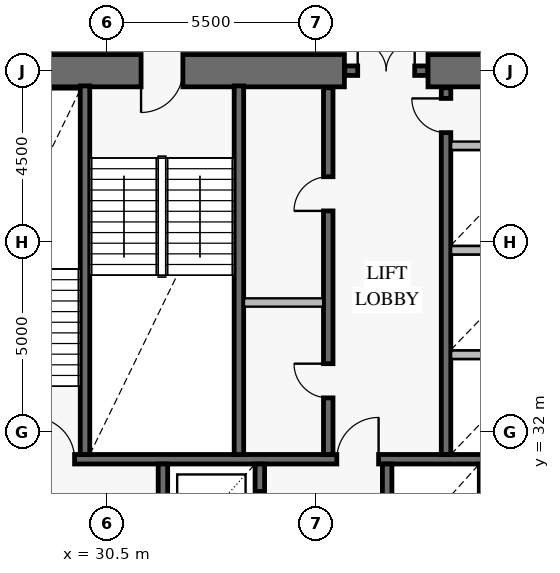
"""IFC4 building model, lengths in metres.
Left out: names, types, materials, properties, quantities, classifications, styles, units other than length and angle.
Written with IfcOpenShell. Run it as: python <this file> out.ifc"""

import sys

from ifc_helpers import new_model, si_unit, direction, frame, frame_2d, origin, place, context, subcontext, project, spatial, rectangle, extrude, element, fill, save


model = new_model("IFC4")
c1 = context("Model", 3, precision=1e-05, world=origin(), true_north=direction((0.0, 1.0)))
c2 = subcontext(c1, "Body", "Model", "MODEL_VIEW")
j1 = project(units=[si_unit("LENGTHUNIT", "METRE"), si_unit("PLANEANGLEUNIT", "RADIAN")], contexts=[c1])
p1 = place(None, origin())
s1 = spatial("IfcSite", under=j1, at=p1, CompositionType="ELEMENT")
p2 = place(p1, origin())
s2 = spatial("IfcBuilding", under=s1, at=p2, CompositionType="ELEMENT")
p3 = place(p2, frame((0.0, 0.0, 12.0)))
s3 = spatial("IfcBuildingStorey", under=s2, at=p3, CompositionType="ELEMENT", Elevation=12.0)
p4 = place(p3, frame((46.925, 41.5, 0.0), z_axis=(0.0, 0.0, 1.0), x_axis=(-1.0, 0.0, 0.0)))
e1 = element("IfcWall", 1, at=p4, inside=s3, PredefinedType="SHEAR", context=c2, shape_type="SweptSolid", body=[
    extrude(rectangle(XDim=7.975, YDim=0.85, at=frame_2d((3.988, 0.0))), origin(), (0.0, 0.0, 1.0), 4.2),
])
p5 = place(p3, frame((36.75, 41.5, 0.0), z_axis=(0.0, 0.0, 1.0), x_axis=(-1.0, 0.0, 0.0)))
e2 = element("IfcWall", 2, at=p5, inside=s3, PredefinedType="SHEAR", context=c2, shape_type="SweptSolid", body=[
    extrude(rectangle(XDim=11.675, YDim=0.85, at=frame_2d((5.837, 0.0))), origin(), (0.0, 0.0, 1.0), 4.2),
])
p6 = place(p5, frame((4.25, 0.0, 0.0)))
e3 = element("IfcOpeningElement", 3, at=p6, cuts=e2, PredefinedType="OPENING", context=c2, shape_type="SweptSolid", body=[
    extrude(rectangle(XDim=1.1, YDim=2.15, at=frame_2d((0.55, 1.075))), frame((0.0, 0.437, 0.0), z_axis=(0.0, -1.0, 0.0), x_axis=(1.0, 0.0, 0.0)), (0.0, 0.0, 1.0), 0.874),
])
p7 = place(p3, frame((36.76, 41.5, 0.0), z_axis=(0.0, 0.0, 1.0), x_axis=(1.0, 0.0, 0.0)))
e4 = element("IfcWall", 4, at=p7, inside=s3, PredefinedType="SOLIDWALL", context=c2, shape_type="SweptSolid", body=[
    extrude(rectangle(XDim=2.18, YDim=0.25, at=frame_2d((1.09, 0.0))), origin(), (0.0, 0.0, 1.0), 4.2),
])
p8 = place(p7, frame((0.34, 0.0, 0.0)))
e5 = element("IfcOpeningElement", 5, at=p8, cuts=e4, PredefinedType="OPENING", context=c2, shape_type="SweptSolid", body=[
    extrude(rectangle(XDim=1.5, YDim=2.15, at=frame_2d((0.75, 1.075))), frame((0.0, 0.137, 0.0), z_axis=(0.0, -1.0, 0.0), x_axis=(1.0, 0.0, 0.0)), (0.0, 0.0, 1.0), 0.274),
])
p9 = place(p3, frame((25.95, 31.275, 0.0), z_axis=(0.0, 0.0, 1.0), x_axis=(1.0, 0.0, 0.0)))
e6 = element("IfcWall", 6, at=p9, inside=s3, PredefinedType="SOLIDWALL", context=c2, shape_type="SweptSolid", body=[
    extrude(rectangle(XDim=20.1, YDim=0.25, at=frame_2d((10.05, 0.0))), origin(), (0.0, 0.0, 1.0), 4.2),
])
p10 = place(p9, frame((2.6, 0.0, 0.0)))
e7 = element("IfcOpeningElement", 7, at=p10, cuts=e6, PredefinedType="OPENING", context=c2, shape_type="SweptSolid", body=[
    extrude(rectangle(XDim=1.1, YDim=2.15, at=frame_2d((0.55, 1.075))), frame((0.0, 0.137, 0.0), z_axis=(0.0, -1.0, 0.0), x_axis=(1.0, 0.0, 0.0)), (0.0, 0.0, 1.0), 0.274),
])
p11 = place(p9, frame((10.6, 0.0, 0.0)))
e8 = element("IfcOpeningElement", 8, at=p11, cuts=e6, PredefinedType="OPENING", context=c2, shape_type="SweptSolid", body=[
    extrude(rectangle(XDim=1.1, YDim=2.15, at=frame_2d((0.55, 1.075))), frame((0.0, 0.137, 0.0), z_axis=(0.0, -1.0, 0.0), x_axis=(1.0, 0.0, 0.0)), (0.0, 0.0, 1.0), 0.274),
])
p12 = place(p9, frame((16.35, 0.0, 0.0)))
e9 = element("IfcOpeningElement", 9, at=p12, cuts=e6, PredefinedType="OPENING", context=c2, shape_type="SweptSolid", body=[
    extrude(rectangle(XDim=1.1, YDim=2.15, at=frame_2d((0.55, 1.075))), frame((0.0, 0.137, 0.0), z_axis=(0.0, -1.0, 0.0), x_axis=(1.0, 0.0, 0.0)), (0.0, 0.0, 1.0), 0.274),
])
for number, where, z_axis, x_axis in (
    (10, (29.925, 31.4, 0.0), (0.0, 0.0, 1.0), (0.0, 1.0, 0.0)),
    (11, (33.975, 31.4, 0.0), (0.0, 0.0, 1.0), (0.0, 1.0, 0.0)),
):
    element("IfcWall", number, at=place(p3, frame(where, z_axis=z_axis, x_axis=x_axis)), inside=s3, PredefinedType="SOLIDWALL", context=c2, shape_type="SweptSolid", body=[
        extrude(rectangle(XDim=9.7, YDim=0.25, at=frame_2d((4.85, 0.0))), origin(), (0.0, 0.0, 1.0), 4.2),
    ])
p13 = place(p3, frame((36.325, 31.4, 0.0), z_axis=(0.0, 0.0, 1.0), x_axis=(0.0, 1.0, 0.0)))
e12 = element("IfcWall", 12, at=p13, inside=s3, PredefinedType="SOLIDWALL", context=c2, shape_type="SweptSolid", body=[
    extrude(rectangle(XDim=9.65, YDim=0.25, at=frame_2d((4.825, 0.0))), origin(), (0.0, 0.0, 1.0), 4.2),
])
p14 = place(p13, frame((1.49, 0.0, 0.0)))
e13 = element("IfcOpeningElement", 13, at=p14, cuts=e12, PredefinedType="OPENING", context=c2, shape_type="SweptSolid", body=[
    extrude(rectangle(XDim=0.9, YDim=2.1, at=frame_2d((0.45, 1.05))), frame((0.0, 0.137, 0.0), z_axis=(0.0, -1.0, 0.0), x_axis=(1.0, 0.0, 0.0)), (0.0, 0.0, 1.0), 0.274),
])
p15 = place(p13, frame((6.41, 0.0, 0.0)))
e14 = element("IfcOpeningElement", 14, at=p15, cuts=e12, PredefinedType="OPENING", context=c2, shape_type="SweptSolid", body=[
    extrude(rectangle(XDim=0.9, YDim=2.1, at=frame_2d((0.45, 1.05))), frame((0.0, 0.137, 0.0), z_axis=(0.0, -1.0, 0.0), x_axis=(1.0, 0.0, 0.0)), (0.0, 0.0, 1.0), 0.274),
])
p16 = place(p3, frame((39.425, 31.4, 0.0), z_axis=(0.0, 0.0, 1.0), x_axis=(0.0, 1.0, 0.0)))
e15 = element("IfcWall", 15, at=p16, inside=s3, PredefinedType="SOLIDWALL", context=c2, shape_type="SweptSolid", body=[
    extrude(rectangle(XDim=9.65, YDim=0.25, at=frame_2d((4.825, 0.0))), origin(), (0.0, 0.0, 1.0), 4.2),
])
p17 = place(p16, frame((8.47, 0.0, 0.0)))
e16 = element("IfcOpeningElement", 16, at=p17, cuts=e15, PredefinedType="OPENING", context=c2, shape_type="SweptSolid", body=[
    extrude(rectangle(XDim=0.9, YDim=2.1, at=frame_2d((0.45, 1.05))), frame((0.0, 0.137, 0.0), z_axis=(0.0, -1.0, 0.0), x_axis=(1.0, 0.0, 0.0)), (0.0, 0.0, 1.0), 0.274),
])
p18 = place(p3, frame((31.975, 22.95, 0.0), z_axis=(0.0, 0.0, 1.0), x_axis=(0.0, 1.0, 0.0)))
e17 = element("IfcWall", 17, at=p18, inside=s3, PredefinedType="SOLIDWALL", context=c2, shape_type="SweptSolid", body=[
    extrude(rectangle(XDim=8.2, YDim=0.25, at=frame_2d((4.1, 0.0))), origin(), (0.0, 0.0, 1.0), 4.2),
])
p19 = place(p3, frame((34.525, 22.95, 0.0), z_axis=(0.0, 0.0, 1.0), x_axis=(0.0, 1.0, 0.0)))
e18 = element("IfcWall", 18, at=p19, inside=s3, PredefinedType="SOLIDWALL", context=c2, shape_type="SweptSolid", body=[
    extrude(rectangle(XDim=8.2, YDim=0.25, at=frame_2d((4.1, 0.0))), origin(), (0.0, 0.0, 1.0), 4.2),
])
p20 = place(p19, frame((0.775, 0.0, 0.0)))
e19 = element("IfcOpeningElement", 19, at=p20, cuts=e18, PredefinedType="OPENING", context=c2, shape_type="SweptSolid", body=[
    extrude(rectangle(XDim=1.1, YDim=2.2, at=frame_2d((0.55, 1.1))), frame((0.0, 0.137, 0.0), z_axis=(0.0, -1.0, 0.0), x_axis=(1.0, 0.0, 0.0)), (0.0, 0.0, 1.0), 0.274),
])
p21 = place(p19, frame((3.575, 0.0, 0.0)))
e20 = element("IfcOpeningElement", 20, at=p21, cuts=e18, PredefinedType="OPENING", context=c2, shape_type="SweptSolid", body=[
    extrude(rectangle(XDim=1.1, YDim=2.2, at=frame_2d((0.55, 1.1))), frame((0.0, 0.137, 0.0), z_axis=(0.0, -1.0, 0.0), x_axis=(1.0, 0.0, 0.0)), (0.0, 0.0, 1.0), 0.274),
])
p22 = place(p19, frame((6.375, 0.0, 0.0)))
e21 = element("IfcOpeningElement", 21, at=p22, cuts=e18, PredefinedType="OPENING", context=c2, shape_type="SweptSolid", body=[
    extrude(rectangle(XDim=1.1, YDim=2.2, at=frame_2d((0.55, 1.1))), frame((0.0, 0.137, 0.0), z_axis=(0.0, -1.0, 0.0), x_axis=(1.0, 0.0, 0.0)), (0.0, 0.0, 1.0), 0.274),
])
p23 = place(p3, frame((37.875, 22.95, 0.0), z_axis=(0.0, 0.0, 1.0), x_axis=(0.0, 1.0, 0.0)))
e22 = element("IfcWall", 22, at=p23, inside=s3, PredefinedType="SOLIDWALL", context=c2, shape_type="SweptSolid", body=[
    extrude(rectangle(XDim=8.2, YDim=0.25, at=frame_2d((4.1, 0.0))), origin(), (0.0, 0.0, 1.0), 4.2),
])
p24 = place(p3, frame((34.108, 35.4, 0.0), z_axis=(0.0, 0.0, 1.0), x_axis=(1.0, 0.0, 0.0)))
e23 = element("IfcWall", 23, at=p24, inside=s3, PredefinedType="PARTITIONING", context=c2, shape_type="SweptSolid", body=[
    extrude(rectangle(XDim=2.084, YDim=0.22, at=frame_2d((1.042, 0.0))), origin(), (0.0, 0.0, 1.0), 3.92),
])
for number, where, z_axis, x_axis in (
    (24, (39.558, 34.025, 0.0), (0.0, 0.0, 1.0), (1.0, 0.0, 0.0)),
    (25, (39.558, 36.775, 0.0), (0.0, 0.0, 1.0), (1.0, 0.0, 0.0)),
    (26, (39.558, 39.525, 0.0), (0.0, 0.0, 1.0), (1.0, 0.0, 0.0)),
):
    element("IfcWall", number, at=place(p3, frame(where, z_axis=z_axis, x_axis=x_axis)), inside=s3, PredefinedType="PARTITIONING", context=c2, shape_type="SweptSolid", body=[
        extrude(rectangle(XDim=2.384, YDim=0.22, at=frame_2d((1.192, 0.0))), origin(), (0.0, 0.0, 1.0), 3.92),
    ])
p25 = place(p6, origin())
e27 = element("IfcDoor", 27, at=p25, inside=s3, OperationType="SINGLE_SWING_RIGHT", PredefinedType="USERDEFINED", context=c2, shape_type="SweptSolid", body=[
    extrude(rectangle(XDim=1.1, YDim=2.15, at=frame_2d((0.55, 1.075))), frame((0.0, 0.025, 0.0), z_axis=(0.0, -1.0, 0.0), x_axis=(1.0, 0.0, 0.0)), (0.0, 0.0, 1.0), 0.05),
])
fill(e3, e27)
p26 = place(p8, origin())
e28 = element("IfcDoor", 28, at=p26, inside=s3, OperationType="DOUBLE_DOOR_SINGLE_SWING", PredefinedType="DOOR", context=c2, shape_type="SweptSolid", body=[
    extrude(rectangle(XDim=1.5, YDim=2.15, at=frame_2d((0.75, 1.075))), frame((0.0, 0.025, 0.0), z_axis=(0.0, -1.0, 0.0), x_axis=(1.0, 0.0, 0.0)), (0.0, 0.0, 1.0), 0.05),
])
fill(e5, e28)
p27 = place(p10, origin())
e29 = element("IfcDoor", 29, at=p27, inside=s3, OperationType="SINGLE_SWING_LEFT", PredefinedType="USERDEFINED", context=c2, shape_type="SweptSolid", body=[
    extrude(rectangle(XDim=1.1, YDim=2.15, at=frame_2d((0.55, 1.075))), frame((0.0, 0.025, 0.0), z_axis=(0.0, -1.0, 0.0), x_axis=(1.0, 0.0, 0.0)), (0.0, 0.0, 1.0), 0.05),
])
fill(e7, e29)
p28 = place(p11, origin())
e30 = element("IfcDoor", 30, at=p28, inside=s3, OperationType="SINGLE_SWING_RIGHT", PredefinedType="USERDEFINED", context=c2, shape_type="SweptSolid", body=[
    extrude(rectangle(XDim=1.1, YDim=2.15, at=frame_2d((0.55, 1.075))), frame((0.0, 0.025, 0.0), z_axis=(0.0, -1.0, 0.0), x_axis=(1.0, 0.0, 0.0)), (0.0, 0.0, 1.0), 0.05),
])
fill(e8, e30)
p29 = place(p14, origin())
e31 = element("IfcDoor", 31, at=p29, inside=s3, OperationType="SINGLE_SWING_RIGHT", PredefinedType="DOOR", context=c2, shape_type="SweptSolid", body=[
    extrude(rectangle(XDim=0.9, YDim=2.1, at=frame_2d((0.45, 1.05))), frame((0.0, 0.025, 0.0), z_axis=(0.0, -1.0, 0.0), x_axis=(1.0, 0.0, 0.0)), (0.0, 0.0, 1.0), 0.05),
])
fill(e13, e31)
p30 = place(p15, origin())
e32 = element("IfcDoor", 32, at=p30, inside=s3, OperationType="SINGLE_SWING_LEFT", PredefinedType="DOOR", context=c2, shape_type="SweptSolid", body=[
    extrude(rectangle(XDim=0.9, YDim=2.1, at=frame_2d((0.45, 1.05))), frame((0.0, 0.025, 0.0), z_axis=(0.0, -1.0, 0.0), x_axis=(1.0, 0.0, 0.0)), (0.0, 0.0, 1.0), 0.05),
])
fill(e14, e32)
p31 = place(p17, origin())
e33 = element("IfcDoor", 33, at=p31, inside=s3, OperationType="SINGLE_SWING_RIGHT", PredefinedType="DOOR", context=c2, shape_type="SweptSolid", body=[
    extrude(rectangle(XDim=0.9, YDim=2.1, at=frame_2d((0.45, 1.05))), frame((0.0, 0.025, 0.0), z_axis=(0.0, -1.0, 0.0), x_axis=(1.0, 0.0, 0.0)), (0.0, 0.0, 1.0), 0.05),
])
fill(e16, e33)
p32 = place(p22, frame((1.1, 0.0, 0.0), z_axis=(0.0, 0.0, 1.0), x_axis=(-1.0, 0.0, 0.0)))
e34 = element("IfcDoor", 34, at=p32, inside=s3, OperationType="DOUBLE_DOOR_SLIDING", PredefinedType="DOOR", context=c2, shape_type="SweptSolid", body=[
    extrude(rectangle(XDim=1.1, YDim=2.2, at=frame_2d((0.55, 1.1))), frame((0.0, 0.025, 0.0), z_axis=(0.0, -1.0, 0.0), x_axis=(1.0, 0.0, 0.0)), (0.0, 0.0, 1.0), 0.05),
])
fill(e21, e34)
save(model, sys.argv[1])
